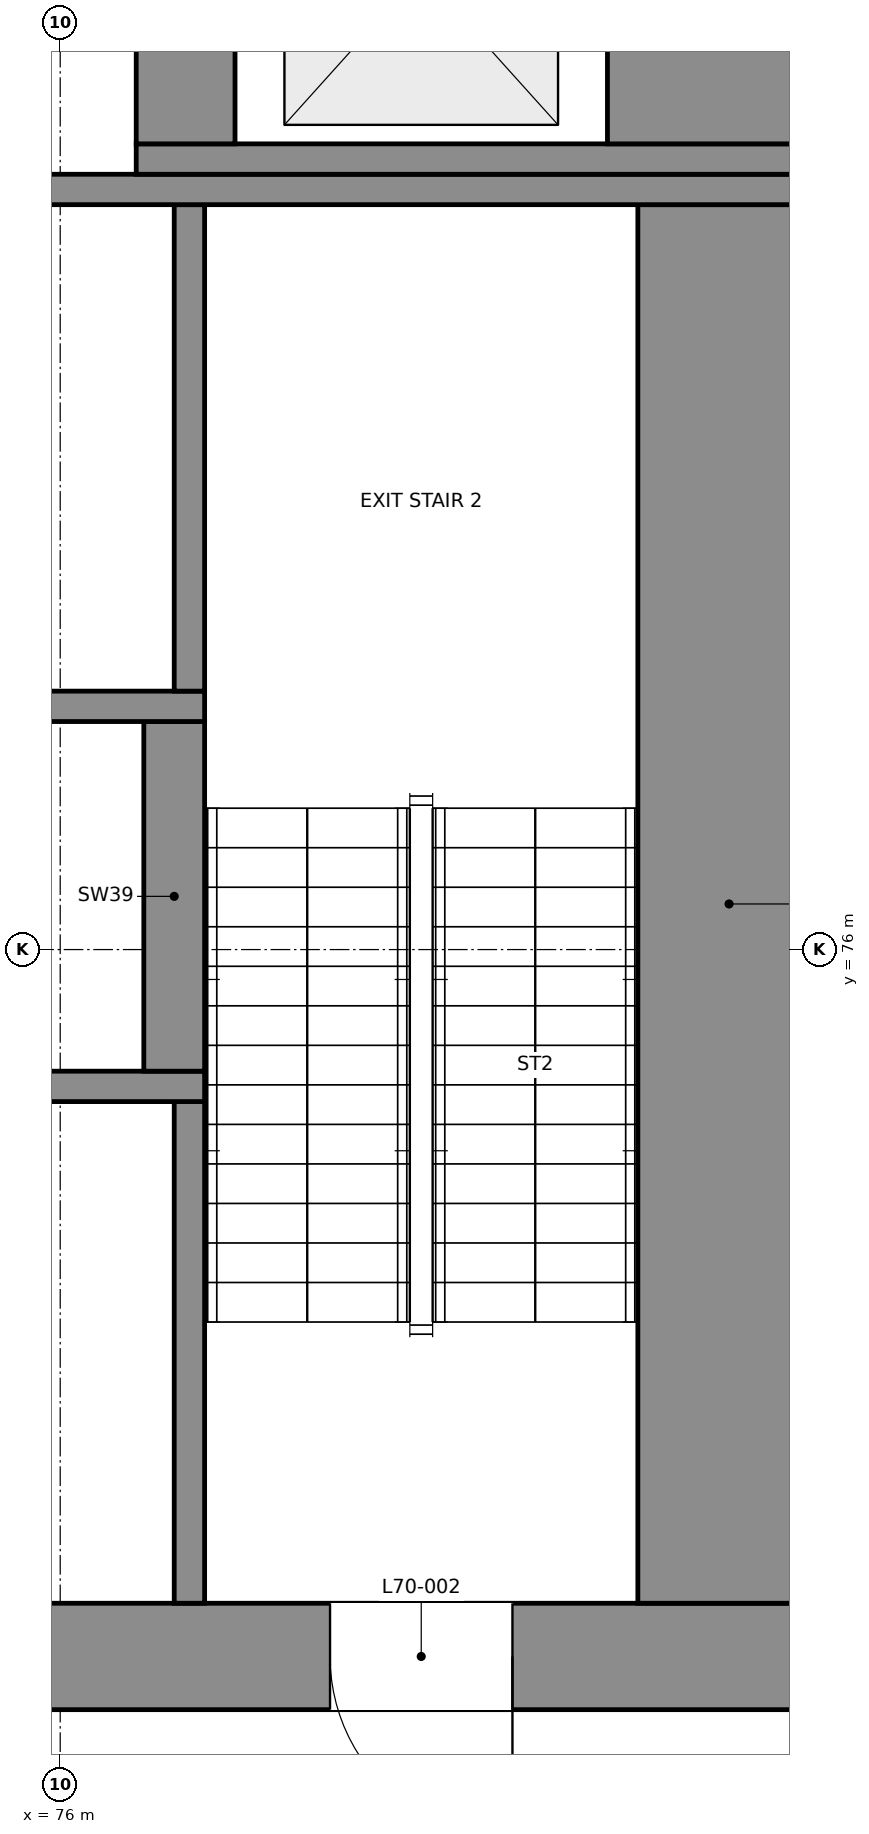
"""IFC4 building model, lengths in metres.
Left out: names, types, materials, properties, quantities, classifications, styles, units other than length and angle.
Written with IfcOpenShell. Run it as: python <this file> out.ifc"""

import sys

from ifc_helpers import new_model, si_unit, direction, frame, frame_2d, origin, place, context, subcontext, project, spatial, rectangle, extrude, element, fill, save


model = new_model("IFC4")
c1 = context("Model", 3, precision=1e-05, world=origin(), true_north=direction((0.0, 1.0)))
c2 = subcontext(c1, "Body", "Model", "MODEL_VIEW")
j1 = project(units=[si_unit("LENGTHUNIT", "METRE"), si_unit("PLANEANGLEUNIT", "RADIAN")], contexts=[c1])
p1 = place(None, origin())
s1 = spatial("IfcSite", under=j1, at=p1, CompositionType="ELEMENT")
p2 = place(p1, origin())
s2 = spatial("IfcBuilding", under=s1, at=p2, CompositionType="ELEMENT")
p3 = place(p2, frame((0.0, 0.0, 295.1)))
s3 = spatial("IfcBuildingStorey", under=s2, at=p3, CompositionType="ELEMENT", Elevation=295.1)
p4 = place(p3, frame((59.0, 71.35, 0.0), z_axis=(0.0, 0.0, 1.0), x_axis=(1.0, 0.0, 0.0)))
e1 = element("IfcWall", 1, at=p4, inside=s3, PredefinedType="SHEAR", context=c2, shape_type="SweptSolid", body=[
    extrude(rectangle(XDim=22.0, YDim=0.7, at=frame_2d((11.0, 0.0))), origin(), (0.0, 0.0, 1.0), 5.0),
])
p5 = place(p4, frame((2.025, 0.0, 0.0)))
e2 = element("IfcOpeningElement", 2, at=p5, cuts=e1, PredefinedType="OPENING", context=c2, shape_type="SweptSolid", body=[
    extrude(rectangle(XDim=1.2, YDim=2.1, at=frame_2d((0.6, 1.05))), frame((0.0, 0.36, 0.0), z_axis=(0.0, -1.0, 0.0), x_axis=(1.0, 0.0, 0.0)), (0.0, 0.0, 1.0), 0.72),
])
p6 = place(p4, frame((18.775, 0.0, 0.0)))
e3 = element("IfcOpeningElement", 3, at=p6, cuts=e1, PredefinedType="OPENING", context=c2, shape_type="SweptSolid", body=[
    extrude(rectangle(XDim=1.2, YDim=2.1, at=frame_2d((0.6, 1.05))), frame((0.0, 0.36, 0.0), z_axis=(0.0, -1.0, 0.0), x_axis=(1.0, 0.0, 0.0)), (0.0, 0.0, 1.0), 0.72),
])
p7 = place(p4, frame((10.0, 0.0, 0.0)))
e4 = element("IfcOpeningElement", 4, at=p7, cuts=e1, PredefinedType="OPENING", context=c2, shape_type="SweptSolid", body=[
    extrude(rectangle(XDim=2.0, YDim=2.1, at=frame_2d((1.0, 1.05))), frame((0.0, 0.36, 0.0), z_axis=(0.0, -1.0, 0.0), x_axis=(1.0, 0.0, 0.0)), (0.0, 0.0, 1.0), 0.72),
])
p8 = place(p3, frame((76.85, 71.7, 0.0), z_axis=(0.0, 0.0, 1.0), x_axis=(0.0, 1.0, 0.0)))
e5 = element("IfcWall", 5, at=p8, inside=s3, PredefinedType="SHEAR", context=c2, shape_type="SweptSolid", body=[
    extrude(rectangle(XDim=3.3, YDim=0.2, at=frame_2d((1.65, 0.0))), origin(), (0.0, 0.0, 1.0), 5.0),
])
p9 = place(p3, frame((80.4, 71.7, 0.0), z_axis=(0.0, 0.0, 1.0), x_axis=(0.0, 1.0, 0.0)))
e6 = element("IfcWall", 6, at=p9, inside=s3, PredefinedType="SHEAR", context=c2, shape_type="SweptSolid", body=[
    extrude(rectangle(XDim=9.2, YDim=1.2, at=frame_2d((4.6, 0.0))), origin(), (0.0, 0.0, 1.0), 5.0),
])
p10 = place(p3, frame((71.25, 75.1, 0.0), z_axis=(0.0, 0.0, 1.0), x_axis=(1.0, 0.0, 0.0)))
e7 = element("IfcWall", 7, at=p10, inside=s3, PredefinedType="SHEAR", context=c2, shape_type="SweptSolid", body=[
    extrude(rectangle(XDim=5.7, YDim=0.2, at=frame_2d((2.85, 0.0))), origin(), (0.0, 0.0, 1.0), 5.0),
])
p11 = place(p3, frame((76.75, 75.2, 0.0), z_axis=(0.0, 0.0, 1.0), x_axis=(0.0, 1.0, 0.0)))
e8 = element("IfcWall", 8, at=p11, inside=s3, PredefinedType="SHEAR", context=c2, shape_type="SweptSolid", body=[
    extrude(rectangle(XDim=2.3, YDim=0.4, at=frame_2d((1.15, 0.0))), origin(), (0.0, 0.0, 1.0), 5.0),
])
p12 = place(p3, frame((71.25, 77.6, 0.0), z_axis=(0.0, 0.0, 1.0), x_axis=(1.0, 0.0, 0.0)))
e9 = element("IfcWall", 9, at=p12, inside=s3, PredefinedType="SHEAR", context=c2, shape_type="SweptSolid", body=[
    extrude(rectangle(XDim=5.7, YDim=0.2, at=frame_2d((2.85, 0.0))), origin(), (0.0, 0.0, 1.0), 5.0),
])
p13 = place(p12, frame((0.485, 0.0, 0.0)))
e10 = element("IfcOpeningElement", 10, at=p13, cuts=e9, PredefinedType="OPENING", context=c2, shape_type="SweptSolid", body=[
    extrude(rectangle(XDim=0.9, YDim=2.1, at=frame_2d((0.45, 1.05))), frame((0.0, 0.11, 0.0), z_axis=(0.0, -1.0, 0.0), x_axis=(1.0, 0.0, 0.0)), (0.0, 0.0, 1.0), 0.22),
])
p14 = place(p12, frame((3.135, 0.0, 0.0)))
e11 = element("IfcOpeningElement", 11, at=p14, cuts=e9, PredefinedType="OPENING", context=c2, shape_type="SweptSolid", body=[
    extrude(rectangle(XDim=0.9, YDim=2.1, at=frame_2d((0.45, 1.05))), frame((0.0, 0.11, 0.0), z_axis=(0.0, -1.0, 0.0), x_axis=(1.0, 0.0, 0.0)), (0.0, 0.0, 1.0), 0.22),
])
p15 = place(p3, frame((76.85, 77.7, 0.0), z_axis=(0.0, 0.0, 1.0), x_axis=(0.0, 1.0, 0.0)))
e12 = element("IfcWall", 12, at=p15, inside=s3, PredefinedType="SHEAR", context=c2, shape_type="SweptSolid", body=[
    extrude(rectangle(XDim=3.2, YDim=0.2, at=frame_2d((1.6, 0.0))), origin(), (0.0, 0.0, 1.0), 5.0),
])
p16 = place(p3, frame((59.0, 81.0, 0.0), z_axis=(0.0, 0.0, 1.0), x_axis=(1.0, 0.0, 0.0)))
e13 = element("IfcWall", 13, at=p16, inside=s3, PredefinedType="SHEAR", context=c2, shape_type="SweptSolid", body=[
    extrude(rectangle(XDim=22.0, YDim=0.2, at=frame_2d((11.0, 0.0))), origin(), (0.0, 0.0, 1.0), 5.0),
])
p17 = place(p16, frame((11.85, 0.0, 0.0)))
e14 = element("IfcOpeningElement", 14, at=p17, cuts=e13, PredefinedType="OPENING", context=c2, shape_type="SweptSolid", body=[
    extrude(rectangle(XDim=0.9, YDim=2.1, at=frame_2d((0.45, 1.05))), frame((0.0, 0.11, 0.0), z_axis=(0.0, -1.0, 0.0), x_axis=(1.0, 0.0, 0.0)), (0.0, 0.0, 1.0), 0.22),
])
p18 = place(p3, frame((76.5, 81.2, 0.0), z_axis=(0.0, 0.0, 1.0), x_axis=(1.0, 0.0, 0.0)))
e15 = element("IfcWall", 15, at=p18, inside=s3, PredefinedType="SHEAR", context=c2, shape_type="SweptSolid", body=[
    extrude(rectangle(XDim=4.5, YDim=0.2, at=frame_2d((2.25, 0.0))), origin(), (0.0, 0.0, 1.0), 5.0),
])
p19 = place(p3, frame((76.825, 81.3, 0.0), z_axis=(0.0, 0.0, 1.0), x_axis=(0.0, 1.0, 0.0)))
e16 = element("IfcWall", 16, at=p19, inside=s3, PredefinedType="SHEAR", context=c2, shape_type="SweptSolid", body=[
    extrude(rectangle(XDim=2.25, YDim=0.65, at=frame_2d((1.125, 0.0))), origin(), (0.0, 0.0, 1.0), 5.0),
])
p20 = place(p3, frame((80.3, 81.3, 0.0), z_axis=(0.0, 0.0, 1.0), x_axis=(0.0, 1.0, 0.0)))
e17 = element("IfcWall", 17, at=p20, inside=s3, PredefinedType="SHEAR", context=c2, shape_type="SweptSolid", body=[
    extrude(rectangle(XDim=2.25, YDim=1.4, at=frame_2d((1.125, 0.0))), origin(), (0.0, 0.0, 1.0), 5.0),
])
p21 = place(p6, frame((1.2, 0.0, 0.0), z_axis=(0.0, 0.0, 1.0), x_axis=(-1.0, 0.0, 0.0)))
e18 = element("IfcDoor", 18, at=p21, inside=s3, OperationType="SINGLE_SWING_LEFT", PredefinedType="DOOR", context=c2, shape_type="SweptSolid", body=[
    extrude(rectangle(XDim=1.2, YDim=2.1, at=frame_2d((0.6, 1.05))), frame((0.0, 0.025, 0.0), z_axis=(0.0, -1.0, 0.0), x_axis=(1.0, 0.0, 0.0)), (0.0, 0.0, 1.0), 0.05),
])
fill(e3, e18)
save(model, sys.argv[1])
